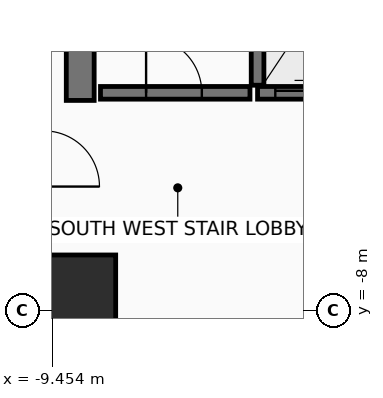
"""IFC4 building model, lengths in metres.
Left out: names, types, materials, properties, quantities, classifications, styles, units other than length and angle.
Written with IfcOpenShell. Run it as: python <this file> out.ifc"""

import sys

from ifc_helpers import new_model, si_unit, direction, frame, frame_2d, origin, origin_2d, place, context, subcontext, project, spatial, rectangle, extrude, element, fill, save


model = new_model("IFC4")
c1 = context("Model", 3, precision=1e-05, world=origin(), true_north=direction((0.0, 1.0)))
c2 = subcontext(c1, "Body", "Model", "MODEL_VIEW")
j1 = project(units=[si_unit("LENGTHUNIT", "METRE"), si_unit("PLANEANGLEUNIT", "RADIAN")], contexts=[c1])
p1 = place(None, origin())
s1 = spatial("IfcSite", under=j1, at=p1, CompositionType="ELEMENT")
p2 = place(p1, origin())
s2 = spatial("IfcBuilding", under=s1, at=p2, CompositionType="ELEMENT")
p3 = place(p2, frame((0.0, 0.0, 21.5)))
s3 = spatial("IfcBuildingStorey", under=s2, at=p3, CompositionType="ELEMENT", Elevation=21.5)
p4 = place(p3, frame((-8.9, -7.6, 0.0), z_axis=(0.0, 0.0, 1.0), x_axis=(1.0, 0.0, 0.0)))
e1 = element("IfcColumn", 1, at=p4, inside=s3, PredefinedType="COLUMN", context=c2, shape_type="SweptSolid", body=[
    extrude(rectangle(XDim=1.4, YDim=1.4, at=origin_2d()), origin(), (0.0, 0.0, 1.0), 5.0),
])
p5 = place(p3, frame((-8.9, -3.85, 0.0), z_axis=(0.0, 0.0, 1.0), x_axis=(0.0, 1.0, 0.0)))
e2 = element("IfcWall", 2, at=p5, inside=s3, PredefinedType="SHEAR", context=c2, shape_type="SweptSolid", body=[
    extrude(rectangle(XDim=10.7, YDim=0.55, at=frame_2d((5.35, 0.0))), origin(), (0.0, 0.0, 1.0), 4.74),
])
p6 = place(p3, frame((-5.4, -3.55, 0.0), z_axis=(0.0, 0.0, 1.0), x_axis=(0.0, 1.0, 0.0)))
e3 = element("IfcWall", 3, at=p6, inside=s3, PredefinedType="SHEAR", context=c2, shape_type="SweptSolid", body=[
    extrude(rectangle(XDim=7.3, YDim=0.25, at=frame_2d((3.65, 0.0))), origin(), (0.0, 0.0, 1.0), 4.74),
])
p7 = place(p3, frame((-8.5, -3.7, 0.0), z_axis=(0.0, 0.0, 1.0), x_axis=(1.0, 0.0, 0.0)))
e4 = element("IfcWall", 4, at=p7, inside=s3, PredefinedType="SHEAR", context=c2, shape_type="SweptSolid", body=[
    extrude(rectangle(XDim=2.95, YDim=0.25, at=frame_2d((1.475, 0.0))), origin(), (0.0, 0.0, 1.0), 4.74),
])
p8 = place(p7, frame((0.9, 0.0, 0.0)))
e5 = element("IfcOpeningElement", 5, at=p8, cuts=e4, PredefinedType="OPENING", context=c2, shape_type="SweptSolid", body=[
    extrude(rectangle(XDim=1.1, YDim=2.15, at=frame_2d((0.55, 1.075))), frame((0.0, 0.135, 0.0), z_axis=(0.0, -1.0, 0.0), x_axis=(1.0, 0.0, 0.0)), (0.0, 0.0, 1.0), 0.27),
])
p9 = place(p3, frame((-5.4, -3.7, 0.0), z_axis=(0.0, 0.0, 1.0), x_axis=(1.0, 0.0, 0.0)))
e6 = element("IfcWall", 6, at=p9, inside=s3, PredefinedType="SHEAR", context=c2, shape_type="SweptSolid", body=[
    extrude(rectangle(XDim=1.9, YDim=0.25, at=frame_2d((0.95, 0.0))), origin(), (0.0, 0.0, 1.0), 4.74),
])
p10 = place(p9, frame((0.35, 0.0, 0.0)))
e7 = element("IfcOpeningElement", 7, at=p10, cuts=e6, PredefinedType="OPENING", context=c2, shape_type="SweptSolid", body=[
    extrude(rectangle(XDim=1.2, YDim=2.2, at=frame_2d((0.6, 1.1))), frame((0.0, 0.135, 0.0), z_axis=(0.0, -1.0, 0.0), x_axis=(1.0, 0.0, 0.0)), (0.0, 0.0, 1.0), 0.27),
])
p11 = place(p8, origin())
e8 = element("IfcDoor", 8, at=p11, inside=s3, OperationType="SINGLE_SWING_LEFT", PredefinedType="DOOR", context=c2, shape_type="SweptSolid", body=[
    extrude(rectangle(XDim=1.1, YDim=2.15, at=frame_2d((0.55, 1.075))), frame((0.0, 0.025, 0.0), z_axis=(0.0, -1.0, 0.0), x_axis=(1.0, 0.0, 0.0)), (0.0, 0.0, 1.0), 0.05),
])
fill(e5, e8)
p12 = place(p10, origin())
e9 = element("IfcDoor", 9, at=p12, inside=s3, OperationType="SLIDING_TO_RIGHT", PredefinedType="DOOR", context=c2, shape_type="SweptSolid", body=[
    extrude(rectangle(XDim=1.2, YDim=2.2, at=frame_2d((0.6, 1.1))), frame((0.0, 0.025, 0.0), z_axis=(0.0, -1.0, 0.0), x_axis=(1.0, 0.0, 0.0)), (0.0, 0.0, 1.0), 0.05),
])
fill(e7, e9)
save(model, sys.argv[1])
